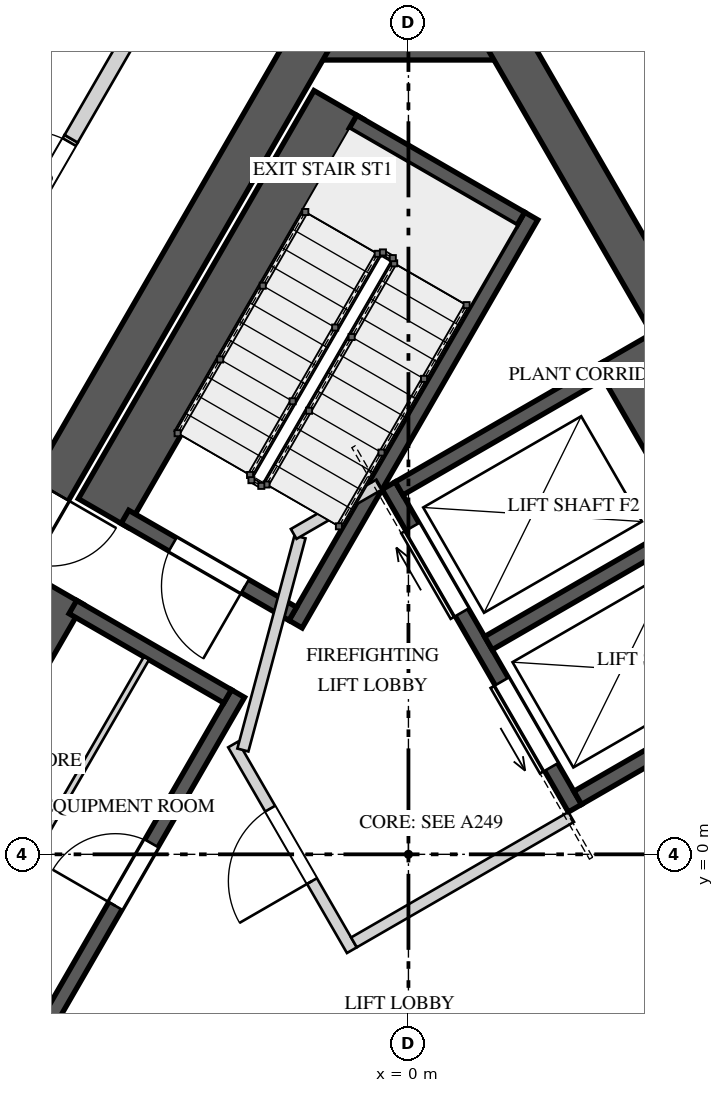
"""IFC4 building model, lengths in metres.
Left out: names, types, materials, properties, quantities, classifications, styles, units other than length and angle.
Written with IfcOpenShell. Run it as: python <this file> out.ifc"""

import sys

from ifc_helpers import new_model, si_unit, direction, frame, frame_2d, origin, place, context, subcontext, project, spatial, polyline, rectangle, outline, extrude, element, fill, save


model = new_model("IFC4")
c1 = context("Model", 3, precision=1e-05, world=origin(), true_north=direction((0.0, 1.0)))
c2 = subcontext(c1, "Body", "Model", "MODEL_VIEW")
j1 = project(units=[si_unit("LENGTHUNIT", "METRE"), si_unit("PLANEANGLEUNIT", "RADIAN")], contexts=[c1])
p1 = place(None, origin())
s1 = spatial("IfcSite", under=j1, at=p1, CompositionType="ELEMENT")
p2 = place(p1, origin())
s2 = spatial("IfcBuilding", under=s1, at=p2, CompositionType="ELEMENT")
p3 = place(p2, frame((0.0, 0.0, 370.4)))
s3 = spatial("IfcBuildingStorey", under=s2, at=p3, CompositionType="ELEMENT", Elevation=370.4)
p4 = place(p3, frame((1.443, 10.725, 0.0), z_axis=(0.0, 0.0, 1.0), x_axis=(-1.0, 0.0, 0.0)))
e1 = element("IfcWall", 1, at=p4, inside=s3, PredefinedType="SHEAR", context=c2, shape_type="SweptSolid", body=[
    extrude(rectangle(XDim=2.887, YDim=0.55, at=frame_2d((1.443, 0.0))), origin(), (0.0, 0.0, 1.0), 4.5),
])
p5 = place(p3, frame((-1.285, 10.725, 0.0), z_axis=(0.0, 0.0, 1.0), x_axis=(-0.499994590896, -0.86602852671, 0.0)))
e2 = element("IfcWall", 2, at=p5, inside=s3, PredefinedType="SHEAR", context=c2, shape_type="SweptSolid", body=[
    extrude(rectangle(XDim=17.292, YDim=0.55, at=frame_2d((8.646, 0.0))), origin(), (0.0, 0.0, 1.0), 4.5),
])
p6 = place(p5, frame((6.851, 0.0, 0.0)))
e3 = element("IfcOpeningElement", 3, at=p6, cuts=e2, PredefinedType="OPENING", context=c2, shape_type="SweptSolid", body=[
    extrude(rectangle(XDim=1.0, YDim=2.4, at=frame_2d((0.5, 1.2))), frame((0.0, 0.285, 0.0), z_axis=(0.0, -1.0, 0.0), x_axis=(1.0, 0.0, 0.0)), (0.0, 0.0, 1.0), 0.57),
])
p7 = place(p5, frame((15.089, 0.0, 0.0)))
e4 = element("IfcOpeningElement", 4, at=p7, cuts=e2, PredefinedType="OPENING", context=c2, shape_type="SweptSolid", body=[
    extrude(rectangle(XDim=0.8, YDim=2.1, at=frame_2d((0.4, 1.05))), frame((0.0, 0.285, 0.0), z_axis=(0.0, -1.0, 0.0), x_axis=(1.0, 0.0, 0.0)), (0.0, 0.0, 1.0), 0.57),
])
p8 = place(p3, frame((9.93, -4.25, 0.0), z_axis=(0.0, 0.0, 1.0), x_axis=(-0.499994590896, 0.86602852671, 0.0)))
e5 = element("IfcWall", 5, at=p8, inside=s3, PredefinedType="SHEAR", context=c2, shape_type="SweptSolid", body=[
    extrude(rectangle(XDim=17.292, YDim=0.55, at=frame_2d((8.646, 0.0))), origin(), (0.0, 0.0, 1.0), 4.5),
])
p9 = place(p8, frame((6.921, 0.0, 0.0)))
e6 = element("IfcOpeningElement", 6, at=p9, cuts=e5, PredefinedType="OPENING", context=c2, shape_type="SweptSolid", body=[
    extrude(rectangle(XDim=1.0, YDim=2.4, at=frame_2d((0.5, 1.2))), frame((0.0, 0.285, 0.0), z_axis=(0.0, -1.0, 0.0), x_axis=(1.0, 0.0, 0.0)), (0.0, 0.0, 1.0), 0.57),
])
p10 = place(p3, frame((-0.918, 9.86, 0.0), z_axis=(0.0, 0.0, 1.0), x_axis=(-0.500026960575, -0.86600983753, 0.0)))
e7 = element("IfcWall", 7, at=p10, inside=s3, PredefinedType="SOLIDWALL", context=c2, shape_type="SweptSolid", body=[
    extrude(rectangle(XDim=6.2, YDim=0.75, at=frame_2d((3.1, 0.0))), origin(), (0.0, 0.0, 1.0), 4.15),
])
p11 = place(p3, frame((1.615, 8.397, 0.0), z_axis=(0.0, 0.0, 1.0), x_axis=(-0.500009909098, -0.866019682689, 0.0)))
e8 = element("IfcWall", 8, at=p11, inside=s3, PredefinedType="SOLIDWALL", context=c2, shape_type="SweptSolid", body=[
    extrude(rectangle(XDim=6.2, YDim=0.2, at=frame_2d((3.1, 0.0))), origin(), (0.0, 0.0, 1.0), 4.15),
])
p12 = place(p3, frame((1.479, 8.361, 0.0), z_axis=(0.0, 0.0, 1.0), x_axis=(-0.865989465428, 0.500062241894, 0.0)))
e9 = element("IfcWall", 9, at=p12, inside=s3, PredefinedType="SOLIDWALL", context=c2, shape_type="SweptSolid", body=[
    extrude(rectangle(XDim=2.55, YDim=0.2, at=frame_2d((1.275, 0.0))), origin(), (0.0, 0.0, 1.0), 4.15),
])
p13 = place(p3, frame((-1.521, 3.165, 0.0), z_axis=(0.0, 0.0, 1.0), x_axis=(-0.866030925526, 0.499990435942, 0.0)))
e10 = element("IfcWall", 10, at=p13, inside=s3, PredefinedType="SOLIDWALL", context=c2, shape_type="SweptSolid", body=[
    extrude(rectangle(XDim=2.55, YDim=0.2, at=frame_2d((1.275, 0.0))), origin(), (0.0, 0.0, 1.0), 4.15),
])
p14 = place(p13, frame((0.725, 0.0, 0.0)))
e11 = element("IfcOpeningElement", 11, at=p14, cuts=e10, PredefinedType="OPENING", context=c2, shape_type="SweptSolid", body=[
    extrude(rectangle(XDim=1.1, YDim=2.4, at=frame_2d((0.55, 1.2))), frame((0.0, 0.11, 0.0), z_axis=(0.0, -1.0, 0.0), x_axis=(1.0, 0.0, 0.0)), (0.0, 0.0, 1.0), 0.22),
])
p15 = place(p3, frame((-4.993, -2.648, 0.0), z_axis=(0.0, 0.0, 1.0), x_axis=(0.499996545922, 0.866027397988, 0.0)))
e12 = element("IfcWall", 12, at=p15, inside=s3, PredefinedType="SOLIDWALL", context=c2, shape_type="SweptSolid", body=[
    extrude(rectangle(XDim=5.5, YDim=0.2, at=frame_2d((2.75, 0.0))), origin(), (0.0, 0.0, 1.0), 4.15),
])
p16 = place(p15, frame((2.275, 0.0, 0.0)))
e13 = element("IfcOpeningElement", 13, at=p16, cuts=e12, PredefinedType="OPENING", context=c2, shape_type="SweptSolid", body=[
    extrude(rectangle(XDim=0.95, YDim=2.4, at=frame_2d((0.475, 1.2))), frame((0.0, 0.11, 0.0), z_axis=(0.0, -1.0, 0.0), x_axis=(1.0, 0.0, 0.0)), (0.0, 0.0, 1.0), 0.22),
])
p17 = place(p3, frame((-4.603, 3.477, 0.0), z_axis=(0.0, 0.0, 1.0), x_axis=(-0.500015767406, -0.866016300277, 0.0)))
e14 = element("IfcWall", 14, at=p17, inside=s3, PredefinedType="SOLIDWALL", context=c2, shape_type="SweptSolid", body=[
    extrude(rectangle(XDim=5.5, YDim=0.75, at=frame_2d((2.75, 0.0))), origin(), (0.0, 0.0, 1.0), 4.15),
])
p18 = place(p3, frame((-2.38, 2.078, 0.0), z_axis=(0.0, 0.0, 1.0), x_axis=(-0.866061024631, 0.499938297808, 0.0)))
e15 = element("IfcWall", 15, at=p18, inside=s3, PredefinedType="SOLIDWALL", context=c2, shape_type="SweptSolid", body=[
    extrude(rectangle(XDim=2.35, YDim=0.2, at=frame_2d((1.175, 0.0))), origin(), (0.0, 0.0, 1.0), 4.15),
])
p19 = place(p3, frame((-5.997, -1.838, 0.0), z_axis=(0.0, 0.0, 1.0), x_axis=(0.500005610874, 0.86602216432, 0.0)))
e16 = element("IfcWall", 16, at=p19, inside=s3, PredefinedType="PARTITIONING", context=c2, shape_type="SweptSolid", body=[
    extrude(rectangle(XDim=5.1, YDim=0.08, at=frame_2d((2.55, 0.0))), origin(), (0.0, 0.0, 1.0), 4.15),
])
p20 = place(p19, frame((1.25, 0.0, 0.0)))
e17 = element("IfcOpeningElement", 17, at=p20, cuts=e16, PredefinedType="OPENING", context=c2, shape_type="SweptSolid", body=[
    extrude(rectangle(XDim=0.8, YDim=2.1, at=frame_2d((0.4, 1.05))), frame((0.0, 0.05, 0.0), z_axis=(0.0, -1.0, 0.0), x_axis=(1.0, 0.0, 0.0)), (0.0, 0.0, 1.0), 0.1),
])
p21 = place(p3, frame((2.19, 0.606, 0.0), z_axis=(0.0, 0.0, 1.0), x_axis=(-0.500002801628, 0.866023786258, 0.0)))
e18 = element("IfcWall", 18, at=p21, inside=s3, PredefinedType="SOLIDWALL", context=c2, shape_type="SweptSolid", body=[
    extrude(rectangle(XDim=4.9, YDim=0.2, at=frame_2d((2.45, 0.0))), origin(), (0.0, 0.0, 1.0), 4.15),
])
p22 = place(p21, frame((0.625, 0.0, 0.0)))
e19 = element("IfcOpeningElement", 19, at=p22, cuts=e18, PredefinedType="OPENING", context=c2, shape_type="SweptSolid", body=[
    extrude(rectangle(XDim=1.3, YDim=2.1, at=frame_2d((0.65, 1.05))), frame((0.0, 0.11, 0.0), z_axis=(0.0, -1.0, 0.0), x_axis=(1.0, 0.0, 0.0)), (0.0, 0.0, 1.0), 0.22),
])
p23 = place(p21, frame((2.975, 0.0, 0.0)))
e20 = element("IfcOpeningElement", 20, at=p23, cuts=e18, PredefinedType="OPENING", context=c2, shape_type="SweptSolid", body=[
    extrude(rectangle(XDim=1.3, YDim=2.1, at=frame_2d((0.65, 1.05))), frame((0.0, 0.11, 0.0), z_axis=(0.0, -1.0, 0.0), x_axis=(1.0, 0.0, 0.0)), (0.0, 0.0, 1.0), 0.22),
])
p24 = place(p3, frame((5.243, 2.369, 0.0), z_axis=(0.0, 0.0, 1.0), x_axis=(-0.500002801628, 0.866023786258, 0.0)))
e21 = element("IfcWall", 21, at=p24, inside=s3, PredefinedType="SOLIDWALL", context=c2, shape_type="SweptSolid", body=[
    extrude(rectangle(XDim=4.9, YDim=0.75, at=frame_2d((2.45, 0.0))), origin(), (0.0, 0.0, 1.0), 4.15),
])
for number, where, z_axis, x_axis in (
    (22, (2.227, 0.743, 0.0), (0.0, 0.0, 1.0), (0.866, 0.5, 0.0)),
    (23, (1.052, 2.778, 0.0), (0.0, 0.0, 1.0), (0.866, 0.5, 0.0)),
    (24, (-0.123, 4.813, 0.0), (0.0, 0.0, 1.0), (0.866, 0.5, 0.0)),
):
    element("IfcWall", number, at=place(p3, frame(where, z_axis=z_axis, x_axis=x_axis)), inside=s3, PredefinedType="SOLIDWALL", context=c2, shape_type="SweptSolid", body=[
        extrude(rectangle(XDim=3.15, YDim=0.2, at=frame_2d((1.575, 0.0))), origin(), (0.0, 0.0, 1.0), 4.15),
    ])
p25 = place(p3, frame((-0.744, -1.261, 0.0), z_axis=(0.0, 0.0, 1.0), x_axis=(-0.500004234368, 0.866022959057, 0.0)))
e25 = element("IfcWall", 25, at=p25, inside=s3, PredefinedType="PARTITIONING", context=c2, shape_type="SweptSolid", body=[
    extrude(rectangle(XDim=3.125, YDim=0.15, at=frame_2d((1.562, 0.0))), origin(), (0.0, 0.0, 1.0), 4.15),
])
p26 = place(p25, frame((1.05, 0.0, 0.0)))
e26 = element("IfcOpeningElement", 26, at=p26, cuts=e25, PredefinedType="OPENING", context=c2, shape_type="SweptSolid", body=[
    extrude(rectangle(XDim=1.1, YDim=2.4, at=frame_2d((0.55, 1.2))), frame((0.0, 0.085, 0.0), z_axis=(0.0, -1.0, 0.0), x_axis=(1.0, 0.0, 0.0)), (0.0, 0.0, 1.0), 0.17),
])
p27 = place(p3, frame((-0.717, -1.159, 0.0), z_axis=(0.0, 0.0, 1.0), x_axis=(0.866008176907, 0.50002983664, 0.0)))
e27 = element("IfcWall", 27, at=p27, inside=s3, PredefinedType="PARTITIONING", context=c2, shape_type="SweptSolid", body=[
    extrude(rectangle(XDim=3.3, YDim=0.15, at=frame_2d((1.65, 0.0))), origin(), (0.0, 0.0, 1.0), 4.15),
])
p28 = place(p3, frame((-2.178, 1.372, 0.0), z_axis=(0.0, 0.0, 1.0), x_axis=(0.258808958833, 0.96592852884, 0.0)))
e28 = element("IfcWall", 28, at=p28, inside=s3, PredefinedType="PARTITIONING", context=c2, shape_type="SweptSolid", body=[
    extrude(rectangle(XDim=2.903, YDim=0.15, at=frame_2d((1.451, 0.0))), origin(), (0.0, 0.0, 1.0), 4.15),
])
p29 = place(p3, frame((-1.51, 4.215, 0.0), z_axis=(0.0, 0.0, 1.0), x_axis=(0.866085525409, 0.49989585183, 0.0)))
e29 = element("IfcWall", 29, at=p29, inside=s3, PredefinedType="PARTITIONING", context=c2, shape_type="SweptSolid", body=[
    extrude(rectangle(XDim=1.3, YDim=0.15, at=frame_2d((0.65, 0.0))), origin(), (0.0, 0.0, 1.0), 4.15),
])
p30 = place(p3, frame((-5.037, 8.375, 0.0), z_axis=(0.0, 0.0, 1.0), x_axis=(0.50012165622, 0.865955154139, 0.0)))
e30 = element("IfcWall", 30, at=p30, inside=s3, PredefinedType="SOLIDWALL", context=c2, shape_type="SweptSolid", body=[
    extrude(outline(polyline([(0.0, 0.0), (1.2, 0.0), (1.2, 4.15), (1.044, 4.15), (1.044, 3.45), (0.217, 3.45), (0.217, 4.15), (0.0, 4.15), (0.0, 0.0)])), frame((0.0, 0.1, 0.0), z_axis=(0.0, -1.0, 0.0), x_axis=(1.0, 0.0, 0.0)), (0.0, 0.0, 1.0), 0.2),
])
p31 = place(p30, frame((0.05, 0.0, 0.0)))
e31 = element("IfcOpeningElement", 31, at=p31, cuts=e30, PredefinedType="OPENING", context=c2, shape_type="SweptSolid", body=[
    extrude(rectangle(XDim=1.1, YDim=2.4, at=frame_2d((0.55, 1.2))), frame((0.0, 0.11, 0.0), z_axis=(0.0, -1.0, 0.0), x_axis=(1.0, 0.0, 0.0)), (0.0, 0.0, 1.0), 0.22),
])
p32 = place(p3, frame((-4.437, 9.414, 0.0), z_axis=(0.0, 0.0, 1.0), x_axis=(0.499967516757, 0.866044157181, 0.0)))
e32 = element("IfcWall", 32, at=p32, inside=s3, PredefinedType="SOLIDWALL", context=c2, shape_type="SweptSolid", body=[
    extrude(rectangle(XDim=3.909, YDim=0.2, at=frame_2d((1.955, 0.0))), origin(), (0.0, 0.0, 1.0), 4.15),
])
p33 = place(p3, frame((2.483, 12.8, 0.0), z_axis=(0.0, 0.0, 1.0), x_axis=(0.499982771656, -0.866035350345, 0.0)))
e33 = element("IfcWall", 33, at=p33, inside=s3, PredefinedType="SOLIDWALL", context=c2, shape_type="SweptSolid", body=[
    extrude(rectangle(XDim=4.195, YDim=0.2, at=frame_2d((2.097, 0.0))), origin(), (0.0, 0.0, 1.0), 4.15),
])
p34 = place(p14, origin())
e34 = element("IfcDoor", 34, at=p34, inside=s3, OperationType="SINGLE_SWING_RIGHT", PredefinedType="DOOR", context=c2, shape_type="SweptSolid", body=[
    extrude(rectangle(XDim=1.1, YDim=2.4, at=frame_2d((0.55, 1.2))), frame((0.0, 0.025, 0.0), z_axis=(0.0, -1.0, 0.0), x_axis=(1.0, 0.0, 0.0)), (0.0, 0.0, 1.0), 0.05),
])
fill(e11, e34)
p35 = place(p16, origin())
e35 = element("IfcDoor", 35, at=p35, inside=s3, OperationType="SINGLE_SWING_LEFT", PredefinedType="DOOR", context=c2, shape_type="SweptSolid", body=[
    extrude(rectangle(XDim=0.95, YDim=2.4, at=frame_2d((0.475, 1.2))), frame((0.0, 0.025, 0.0), z_axis=(0.0, -1.0, 0.0), x_axis=(1.0, 0.0, 0.0)), (0.0, 0.0, 1.0), 0.05),
])
fill(e13, e35)
p36 = place(p22, origin())
e36 = element("IfcDoor", 36, at=p36, inside=s3, OperationType="SLIDING_TO_LEFT", PredefinedType="DOOR", context=c2, shape_type="SweptSolid", body=[
    extrude(rectangle(XDim=1.3, YDim=2.1, at=frame_2d((0.65, 1.05))), frame((0.0, 0.025, 0.0), z_axis=(0.0, -1.0, 0.0), x_axis=(1.0, 0.0, 0.0)), (0.0, 0.0, 1.0), 0.05),
])
fill(e19, e36)
p37 = place(p23, origin())
e37 = element("IfcDoor", 37, at=p37, inside=s3, OperationType="SLIDING_TO_RIGHT", PredefinedType="DOOR", context=c2, shape_type="SweptSolid", body=[
    extrude(rectangle(XDim=1.3, YDim=2.1, at=frame_2d((0.65, 1.05))), frame((0.0, 0.025, 0.0), z_axis=(0.0, -1.0, 0.0), x_axis=(1.0, 0.0, 0.0)), (0.0, 0.0, 1.0), 0.05),
])
fill(e20, e37)
p38 = place(p26, origin())
e38 = element("IfcDoor", 38, at=p38, inside=s3, OperationType="SINGLE_SWING_LEFT", PredefinedType="DOOR", context=c2, shape_type="SweptSolid", body=[
    extrude(rectangle(XDim=1.1, YDim=2.4, at=frame_2d((0.55, 1.2))), frame((0.0, 0.025, 0.0), z_axis=(0.0, -1.0, 0.0), x_axis=(1.0, 0.0, 0.0)), (0.0, 0.0, 1.0), 0.05),
])
fill(e26, e38)
p39 = place(p31, origin())
e39 = element("IfcDoor", 39, at=p39, inside=s3, OperationType="SINGLE_SWING_RIGHT", PredefinedType="DOOR", context=c2, shape_type="SweptSolid", body=[
    extrude(rectangle(XDim=1.1, YDim=2.4, at=frame_2d((0.55, 1.2))), frame((0.0, 0.025, 0.0), z_axis=(0.0, -1.0, 0.0), x_axis=(1.0, 0.0, 0.0)), (0.0, 0.0, 1.0), 0.05),
])
fill(e31, e39)
save(model, sys.argv[1])
